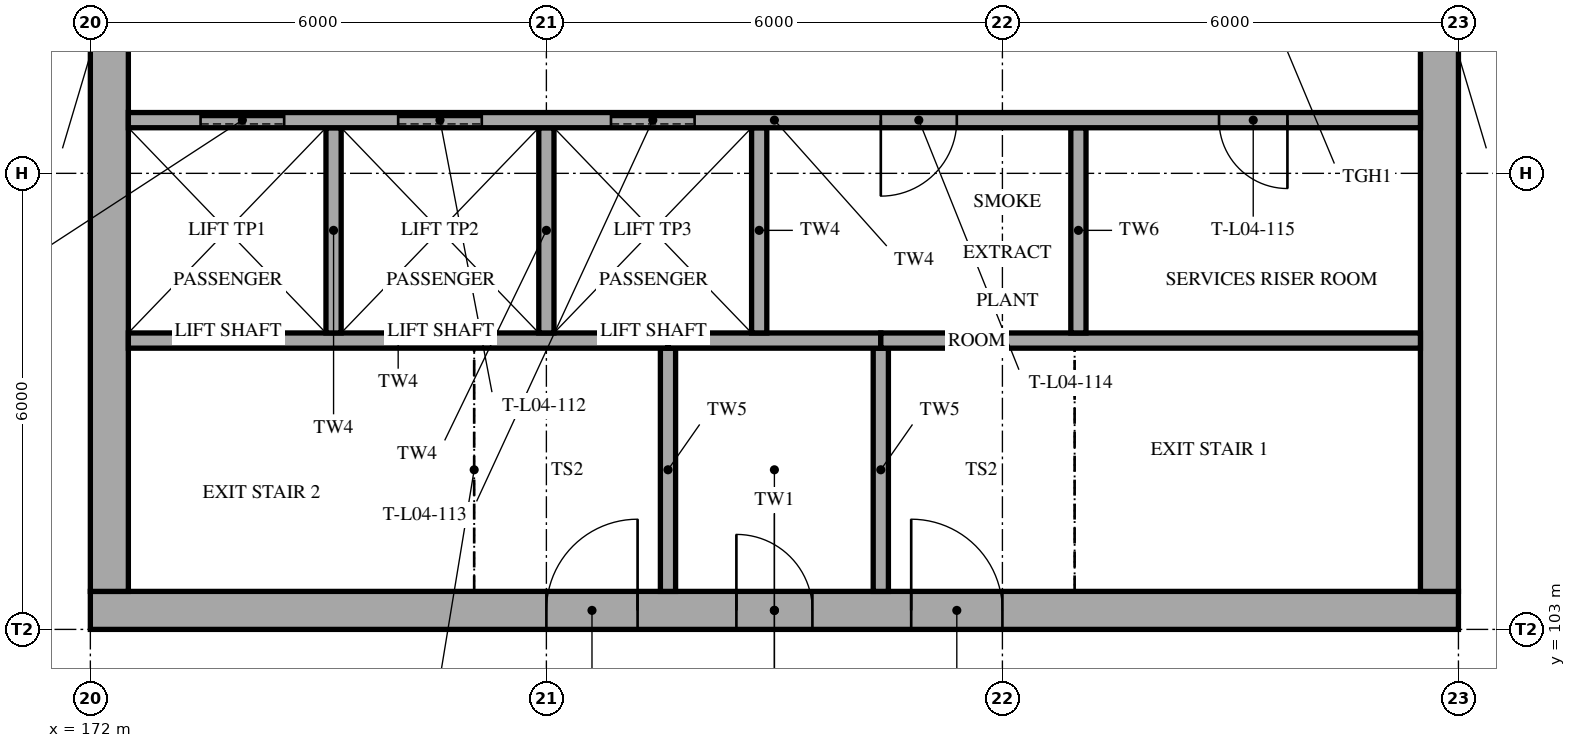
"""IFC4 building model, lengths in metres.
Left out: names, types, materials, properties, quantities, classifications, styles, units other than length and angle.
Written with IfcOpenShell. Run it as: python <this file> out.ifc"""

import sys

from ifc_helpers import new_model, si_unit, direction, frame, frame_2d, origin, place, context, subcontext, project, spatial, rectangle, extrude, element, fill, save


model = new_model("IFC4")
c1 = context("Model", 3, precision=1e-05, world=origin(), true_north=direction((0.0, 1.0)))
c2 = subcontext(c1, "Body", "Model", "MODEL_VIEW")
j1 = project(units=[si_unit("LENGTHUNIT", "METRE"), si_unit("PLANEANGLEUNIT", "RADIAN")], contexts=[c1])
p1 = place(None, origin())
s1 = spatial("IfcSite", under=j1, at=p1, CompositionType="ELEMENT")
p2 = place(p1, origin())
s2 = spatial("IfcBuilding", under=s1, at=p2, CompositionType="ELEMENT")
p3 = place(p2, frame((0.0, 0.0, 19.2)))
s3 = spatial("IfcBuildingStorey", under=s2, at=p3, CompositionType="ELEMENT", Elevation=19.2)
p4 = place(p3, frame((172.0, 103.25, 0.0), z_axis=(0.0, 0.0, 1.0), x_axis=(1.0, 0.0, 0.0)))
e1 = element("IfcWall", 1, at=p4, inside=s3, PredefinedType="SHEAR", context=c2, shape_type="SweptSolid", body=[
    extrude(rectangle(XDim=18.0, YDim=0.5, at=frame_2d((9.0, 0.0))), origin(), (0.0, 0.0, 1.0), 4.2),
])
p5 = place(p4, frame((8.5, 0.0, 0.0)))
e2 = element("IfcOpeningElement", 2, at=p5, cuts=e1, PredefinedType="OPENING", context=c2, shape_type="SweptSolid", body=[
    extrude(rectangle(XDim=1.0, YDim=2.1, at=frame_2d((0.5, 1.05))), frame((0.0, 0.26, 0.0), z_axis=(0.0, -1.0, 0.0), x_axis=(1.0, 0.0, 0.0)), (0.0, 0.0, 1.0), 0.52),
])
p6 = place(p4, frame((6.0, 0.0, 0.0)))
e3 = element("IfcOpeningElement", 3, at=p6, cuts=e1, PredefinedType="OPENING", context=c2, shape_type="SweptSolid", body=[
    extrude(rectangle(XDim=1.2, YDim=2.1, at=frame_2d((0.6, 1.05))), frame((0.0, 0.26, 0.0), z_axis=(0.0, -1.0, 0.0), x_axis=(1.0, 0.0, 0.0)), (0.0, 0.0, 1.0), 0.52),
])
p7 = place(p4, frame((10.8, 0.0, 0.0)))
e4 = element("IfcOpeningElement", 4, at=p7, cuts=e1, PredefinedType="OPENING", context=c2, shape_type="SweptSolid", body=[
    extrude(rectangle(XDim=1.2, YDim=2.1, at=frame_2d((0.6, 1.05))), frame((0.0, 0.26, 0.0), z_axis=(0.0, -1.0, 0.0), x_axis=(1.0, 0.0, 0.0)), (0.0, 0.0, 1.0), 0.52),
])
p8 = place(p3, frame((172.25, 103.5, 0.0), z_axis=(0.0, 0.0, 1.0), x_axis=(0.0, 1.0, 0.0)))
e5 = element("IfcWall", 5, at=p8, inside=s3, PredefinedType="SHEAR", context=c2, shape_type="SweptSolid", body=[
    extrude(rectangle(XDim=17.0, YDim=0.5, at=frame_2d((8.5, 0.0))), origin(), (0.0, 0.0, 1.0), 4.2),
])
p9 = place(p8, frame((7.2, 0.0, 0.0)))
e6 = element("IfcOpeningElement", 6, at=p9, cuts=e5, PredefinedType="OPENING", context=c2, shape_type="SweptSolid", body=[
    extrude(rectangle(XDim=1.4, YDim=2.1, at=frame_2d((0.7, 1.05))), frame((0.0, 0.26, 0.0), z_axis=(0.0, -1.0, 0.0), x_axis=(1.0, 0.0, 0.0)), (0.0, 0.0, 1.0), 0.52),
])
p10 = place(p3, frame((189.75, 103.5, 0.0), z_axis=(0.0, 0.0, 1.0), x_axis=(0.0, 1.0, 0.0)))
e7 = element("IfcWall", 7, at=p10, inside=s3, PredefinedType="SHEAR", context=c2, shape_type="SweptSolid", body=[
    extrude(rectangle(XDim=17.0, YDim=0.5, at=frame_2d((8.5, 0.0))), origin(), (0.0, 0.0, 1.0), 4.2),
])
p11 = place(p10, frame((7.2, 0.0, 0.0)))
e8 = element("IfcOpeningElement", 8, at=p11, cuts=e7, PredefinedType="OPENING", context=c2, shape_type="SweptSolid", body=[
    extrude(rectangle(XDim=1.4, YDim=2.1, at=frame_2d((0.7, 1.05))), frame((0.0, 0.26, 0.0), z_axis=(0.0, -1.0, 0.0), x_axis=(1.0, 0.0, 0.0)), (0.0, 0.0, 1.0), 0.52),
])
for number, where, z_axis, x_axis in (
    (9, (179.6, 103.5, 0.0), (0.0, 0.0, 1.0), (0.0, 1.0, 0.0)),
    (10, (182.4, 103.5, 0.0), (0.0, 0.0, 1.0), (0.0, 1.0, 0.0)),
):
    element("IfcWall", number, at=place(p3, frame(where, z_axis=z_axis, x_axis=x_axis)), inside=s3, PredefinedType="SOLIDWALL", context=c2, shape_type="SweptSolid", body=[
        extrude(rectangle(XDim=3.2, YDim=0.2, at=frame_2d((1.6, 0.0))), origin(), (0.0, 0.0, 1.0), 4.0),
    ])
p12 = place(p3, frame((172.5, 106.8, 0.0), z_axis=(0.0, 0.0, 1.0), x_axis=(1.0, 0.0, 0.0)))
e11 = element("IfcWall", 11, at=p12, inside=s3, PredefinedType="SOLIDWALL", context=c2, shape_type="SweptSolid", body=[
    extrude(rectangle(XDim=7.1, YDim=0.2, at=frame_2d((3.55, 0.0))), origin(), (0.0, 0.0, 1.0), 4.0),
])
p13 = place(p3, frame((179.6, 106.8, 0.0), z_axis=(0.0, 0.0, 1.0), x_axis=(1.0, 0.0, 0.0)))
e12 = element("IfcWall", 12, at=p13, inside=s3, PredefinedType="SOLIDWALL", context=c2, shape_type="SweptSolid", body=[
    extrude(rectangle(XDim=2.8, YDim=0.2, at=frame_2d((1.4, 0.0))), origin(), (0.0, 0.0, 1.0), 4.0),
])
p14 = place(p3, frame((182.4, 106.8, 0.0), z_axis=(0.0, 0.0, 1.0), x_axis=(1.0, 0.0, 0.0)))
e13 = element("IfcWall", 13, at=p14, inside=s3, PredefinedType="SOLIDWALL", context=c2, shape_type="SweptSolid", body=[
    extrude(rectangle(XDim=7.1, YDim=0.2, at=frame_2d((3.55, 0.0))), origin(), (0.0, 0.0, 1.0), 4.0),
])
for number, where, z_axis, x_axis in (
    (14, (175.2, 106.9, 0.0), (0.0, 0.0, 1.0), (0.0, 1.0, 0.0)),
    (15, (178.0, 106.9, 0.0), (0.0, 0.0, 1.0), (0.0, 1.0, 0.0)),
    (16, (180.8, 106.9, 0.0), (0.0, 0.0, 1.0), (0.0, 1.0, 0.0)),
    (17, (185.0, 106.9, 0.0), (0.0, 0.0, 1.0), (0.0, 1.0, 0.0)),
):
    element("IfcWall", number, at=place(p3, frame(where, z_axis=z_axis, x_axis=x_axis)), inside=s3, PredefinedType="SOLIDWALL", context=c2, shape_type="SweptSolid", body=[
        extrude(rectangle(XDim=2.7, YDim=0.2, at=frame_2d((1.35, 0.0))), origin(), (0.0, 0.0, 1.0), 4.0),
    ])
p15 = place(p3, frame((172.5, 109.7, 0.0), z_axis=(0.0, 0.0, 1.0), x_axis=(1.0, 0.0, 0.0)))
e18 = element("IfcWall", 18, at=p15, inside=s3, PredefinedType="SOLIDWALL", context=c2, shape_type="SweptSolid", body=[
    extrude(rectangle(XDim=17.0, YDim=0.2, at=frame_2d((8.5, 0.0))), origin(), (0.0, 0.0, 1.0), 4.0),
])
p16 = place(p15, frame((0.95, 0.0, 0.0)))
e19 = element("IfcOpeningElement", 19, at=p16, cuts=e18, PredefinedType="OPENING", context=c2, shape_type="SweptSolid", body=[
    extrude(rectangle(XDim=1.1, YDim=2.1, at=frame_2d((0.55, 1.05))), frame((0.0, 0.11, 0.0), z_axis=(0.0, -1.0, 0.0), x_axis=(1.0, 0.0, 0.0)), (0.0, 0.0, 1.0), 0.22),
])
p17 = place(p15, frame((3.55, 0.0, 0.0)))
e20 = element("IfcOpeningElement", 20, at=p17, cuts=e18, PredefinedType="OPENING", context=c2, shape_type="SweptSolid", body=[
    extrude(rectangle(XDim=1.1, YDim=2.1, at=frame_2d((0.55, 1.05))), frame((0.0, 0.11, 0.0), z_axis=(0.0, -1.0, 0.0), x_axis=(1.0, 0.0, 0.0)), (0.0, 0.0, 1.0), 0.22),
])
p18 = place(p15, frame((6.35, 0.0, 0.0)))
e21 = element("IfcOpeningElement", 21, at=p18, cuts=e18, PredefinedType="OPENING", context=c2, shape_type="SweptSolid", body=[
    extrude(rectangle(XDim=1.1, YDim=2.1, at=frame_2d((0.55, 1.05))), frame((0.0, 0.11, 0.0), z_axis=(0.0, -1.0, 0.0), x_axis=(1.0, 0.0, 0.0)), (0.0, 0.0, 1.0), 0.22),
])
p19 = place(p15, frame((9.9, 0.0, 0.0)))
e22 = element("IfcOpeningElement", 22, at=p19, cuts=e18, PredefinedType="OPENING", context=c2, shape_type="SweptSolid", body=[
    extrude(rectangle(XDim=1.0, YDim=2.1, at=frame_2d((0.5, 1.05))), frame((0.0, 0.11, 0.0), z_axis=(0.0, -1.0, 0.0), x_axis=(1.0, 0.0, 0.0)), (0.0, 0.0, 1.0), 0.22),
])
p20 = place(p15, frame((14.35, 0.0, 0.0)))
e23 = element("IfcOpeningElement", 23, at=p20, cuts=e18, PredefinedType="OPENING", context=c2, shape_type="SweptSolid", body=[
    extrude(rectangle(XDim=0.9, YDim=2.1, at=frame_2d((0.45, 1.05))), frame((0.0, 0.11, 0.0), z_axis=(0.0, -1.0, 0.0), x_axis=(1.0, 0.0, 0.0)), (0.0, 0.0, 1.0), 0.22),
])
p21 = place(p5, origin())
e24 = element("IfcDoor", 24, at=p21, inside=s3, OperationType="SINGLE_SWING_LEFT", PredefinedType="DOOR", context=c2, shape_type="SweptSolid", body=[
    extrude(rectangle(XDim=1.0, YDim=2.1, at=frame_2d((0.5, 1.05))), frame((0.0, 0.025, 0.0), z_axis=(0.0, -1.0, 0.0), x_axis=(1.0, 0.0, 0.0)), (0.0, 0.0, 1.0), 0.05),
])
fill(e2, e24)
p22 = place(p16, origin())
e25 = element("IfcDoor", 25, at=p22, inside=s3, OperationType="SLIDING_TO_LEFT", PredefinedType="DOOR", context=c2, shape_type="SweptSolid", body=[
    extrude(rectangle(XDim=1.1, YDim=2.1, at=frame_2d((0.55, 1.05))), frame((0.0, 0.025, 0.0), z_axis=(0.0, -1.0, 0.0), x_axis=(1.0, 0.0, 0.0)), (0.0, 0.0, 1.0), 0.05),
])
fill(e19, e25)
p23 = place(p17, origin())
e26 = element("IfcDoor", 26, at=p23, inside=s3, OperationType="SLIDING_TO_LEFT", PredefinedType="DOOR", context=c2, shape_type="SweptSolid", body=[
    extrude(rectangle(XDim=1.1, YDim=2.1, at=frame_2d((0.55, 1.05))), frame((0.0, 0.025, 0.0), z_axis=(0.0, -1.0, 0.0), x_axis=(1.0, 0.0, 0.0)), (0.0, 0.0, 1.0), 0.05),
])
fill(e20, e26)
p24 = place(p18, origin())
e27 = element("IfcDoor", 27, at=p24, inside=s3, OperationType="SLIDING_TO_LEFT", PredefinedType="DOOR", context=c2, shape_type="SweptSolid", body=[
    extrude(rectangle(XDim=1.1, YDim=2.1, at=frame_2d((0.55, 1.05))), frame((0.0, 0.025, 0.0), z_axis=(0.0, -1.0, 0.0), x_axis=(1.0, 0.0, 0.0)), (0.0, 0.0, 1.0), 0.05),
])
fill(e21, e27)
p25 = place(p19, frame((1.0, 0.0, 0.0), z_axis=(0.0, 0.0, 1.0), x_axis=(-1.0, 0.0, 0.0)))
e28 = element("IfcDoor", 28, at=p25, inside=s3, OperationType="SINGLE_SWING_RIGHT", PredefinedType="DOOR", context=c2, shape_type="SweptSolid", body=[
    extrude(rectangle(XDim=1.0, YDim=2.1, at=frame_2d((0.5, 1.05))), frame((0.0, 0.025, 0.0), z_axis=(0.0, -1.0, 0.0), x_axis=(1.0, 0.0, 0.0)), (0.0, 0.0, 1.0), 0.05),
])
fill(e22, e28)
p26 = place(p20, frame((0.9, 0.0, 0.0), z_axis=(0.0, 0.0, 1.0), x_axis=(-1.0, 0.0, 0.0)))
e29 = element("IfcDoor", 29, at=p26, inside=s3, OperationType="SINGLE_SWING_LEFT", PredefinedType="DOOR", context=c2, shape_type="SweptSolid", body=[
    extrude(rectangle(XDim=0.9, YDim=2.1, at=frame_2d((0.45, 1.05))), frame((0.0, 0.025, 0.0), z_axis=(0.0, -1.0, 0.0), x_axis=(1.0, 0.0, 0.0)), (0.0, 0.0, 1.0), 0.05),
])
fill(e23, e29)
p27 = place(p6, origin())
e30 = element("IfcDoor", 30, at=p27, inside=s3, OperationType="SINGLE_SWING_RIGHT", PredefinedType="DOOR", context=c2, shape_type="SweptSolid", body=[
    extrude(rectangle(XDim=1.2, YDim=2.1, at=frame_2d((0.6, 1.05))), frame((0.0, 0.025, 0.0), z_axis=(0.0, -1.0, 0.0), x_axis=(1.0, 0.0, 0.0)), (0.0, 0.0, 1.0), 0.05),
])
fill(e3, e30)
p28 = place(p7, origin())
e31 = element("IfcDoor", 31, at=p28, inside=s3, OperationType="SINGLE_SWING_LEFT", PredefinedType="DOOR", context=c2, shape_type="SweptSolid", body=[
    extrude(rectangle(XDim=1.2, YDim=2.1, at=frame_2d((0.6, 1.05))), frame((0.0, 0.025, 0.0), z_axis=(0.0, -1.0, 0.0), x_axis=(1.0, 0.0, 0.0)), (0.0, 0.0, 1.0), 0.05),
])
fill(e4, e31)
save(model, sys.argv[1])
